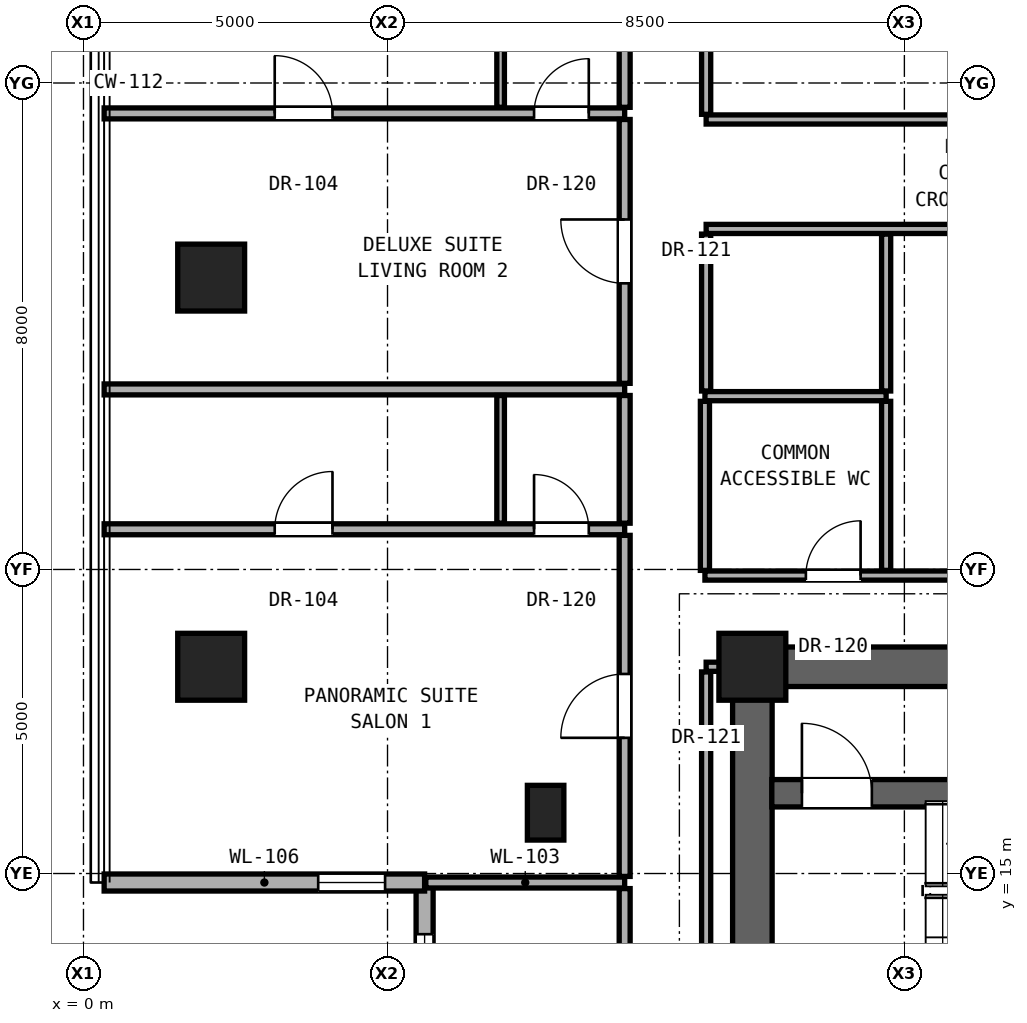
"""IFC4 building model, lengths in metres.
Left out: names, types, materials, properties, quantities, classifications, styles, units other than length and angle.
Written with IfcOpenShell. Run it as: python <this file> out.ifc"""

import sys

from ifc_helpers import new_model, si_unit, direction, frame, frame_2d, origin, origin_2d, place, context, subcontext, project, spatial, rectangle, hollow_rectangle, extrude, element, fill, save


model = new_model("IFC4")
c1 = context("Model", 3, precision=1e-05, world=origin(), true_north=direction((0.0, 1.0)))
c2 = subcontext(c1, "Body", "Model", "MODEL_VIEW")
j1 = project(units=[si_unit("LENGTHUNIT", "METRE"), si_unit("PLANEANGLEUNIT", "RADIAN")], contexts=[c1])
p1 = place(None, origin())
s1 = spatial("IfcSite", under=j1, at=p1, CompositionType="ELEMENT")
p2 = place(p1, origin())
s2 = spatial("IfcBuilding", under=s1, at=p2, CompositionType="ELEMENT")
p3 = place(p2, frame((0.0, 0.0, 121.4)))
s3 = spatial("IfcBuildingStorey", under=s2, at=p3, CompositionType="ELEMENT", Elevation=121.4)
p4 = place(p3, frame((11.0, 18.4, 0.0), z_axis=(0.0, 0.0, 1.0), x_axis=(1.0, 0.0, 0.0)))
e1 = element("IfcColumn", 1, at=p4, inside=s3, PredefinedType="COLUMN", context=c2, shape_type="SweptSolid", body=[
    extrude(rectangle(XDim=1.1, YDim=1.1, at=origin_2d()), origin(), (0.0, 0.0, 1.0), 3.3),
])
for number, where, z_axis, x_axis in (
    (2, (2.1, 18.4, 0.0), (0.0, 0.0, 1.0), (1.0, 0.0, 0.0)),
    (3, (2.1, 24.8, 0.0), (0.0, 0.0, 1.0), (1.0, 0.0, 0.0)),
):
    element("IfcColumn", number, at=place(p3, frame(where, z_axis=z_axis, x_axis=x_axis)), inside=s3, PredefinedType="COLUMN", context=c2, shape_type="SweptSolid", body=[
        extrude(hollow_rectangle(XDim=1.1, YDim=1.1, WallThickness=0.06, at=origin_2d()), origin(), (0.0, 0.0, 1.0), 3.3),
    ])
p5 = place(p3, frame((7.6, 16.0, 0.0), z_axis=(0.0, 0.0, 1.0), x_axis=(1.0, 0.0, 0.0)))
e4 = element("IfcColumn", 4, at=p5, inside=s3, PredefinedType="PILASTER", context=c2, shape_type="SweptSolid", body=[
    extrude(rectangle(XDim=0.6, YDim=0.9, at=origin_2d()), origin(), (0.0, 0.0, 1.0), 3.3),
])
p6 = place(p3, frame((11.0, 12.4, 0.0), z_axis=(0.0, 0.0, 1.0), x_axis=(0.0, 1.0, 0.0)))
e5 = element("IfcWall", 5, at=p6, inside=s3, PredefinedType="SHEAR", context=c2, shape_type="SweptSolid", body=[
    extrude(rectangle(XDim=6.0, YDim=0.65, at=frame_2d((3.0, 0.0))), origin(), (0.0, 0.0, 1.0), 3.08),
])
p7 = place(p3, frame((11.0, 18.4, 0.0), z_axis=(0.0, 0.0, 1.0), x_axis=(1.0, 0.0, 0.0)))
e6 = element("IfcWall", 6, at=p7, inside=s3, PredefinedType="SHEAR", context=c2, shape_type="SweptSolid", body=[
    extrude(rectangle(XDim=19.0, YDim=0.65, at=frame_2d((9.5, 0.0))), origin(), (0.0, 0.0, 1.0), 3.08),
])
p8 = place(p7, frame((4.175, 0.0, 0.0)))
e7 = element("IfcOpeningElement", 7, at=p8, cuts=e6, PredefinedType="OPENING", context=c2, shape_type="SweptSolid", body=[
    extrude(rectangle(XDim=1.2, YDim=2.25, at=frame_2d((0.6, 1.125))), frame((0.0, 0.335, 0.0), z_axis=(0.0, -1.0, 0.0), x_axis=(1.0, 0.0, 0.0)), (0.0, 0.0, 1.0), 0.67),
])
p9 = place(p7, frame((9.6, 0.0, 0.0)))
e8 = element("IfcOpeningElement", 8, at=p9, cuts=e6, PredefinedType="OPENING", context=c2, shape_type="SweptSolid", body=[
    extrude(rectangle(XDim=1.3, YDim=2.3, at=frame_2d((0.65, 1.15))), frame((0.0, 0.335, 0.0), z_axis=(0.0, -1.0, 0.0), x_axis=(1.0, 0.0, 0.0)), (0.0, 0.0, 1.0), 0.67),
])
p10 = place(p7, frame((11.9, 0.0, 0.0)))
e9 = element("IfcOpeningElement", 9, at=p10, cuts=e6, PredefinedType="OPENING", context=c2, shape_type="SweptSolid", body=[
    extrude(rectangle(XDim=1.3, YDim=2.3, at=frame_2d((0.65, 1.15))), frame((0.0, 0.335, 0.0), z_axis=(0.0, -1.0, 0.0), x_axis=(1.0, 0.0, 0.0)), (0.0, 0.0, 1.0), 0.67),
])
p11 = place(p7, frame((14.3, 0.0, 0.0)))
e10 = element("IfcOpeningElement", 10, at=p11, cuts=e6, PredefinedType="OPENING", context=c2, shape_type="SweptSolid", body=[
    extrude(rectangle(XDim=1.3, YDim=2.3, at=frame_2d((0.65, 1.15))), frame((0.0, 0.335, 0.0), z_axis=(0.0, -1.0, 0.0), x_axis=(1.0, 0.0, 0.0)), (0.0, 0.0, 1.0), 0.67),
])
p12 = place(p7, frame((16.6, 0.0, 0.0)))
e11 = element("IfcOpeningElement", 11, at=p12, cuts=e6, PredefinedType="OPENING", context=c2, shape_type="SweptSolid", body=[
    extrude(rectangle(XDim=1.3, YDim=2.3, at=frame_2d((0.65, 1.15))), frame((0.0, 0.335, 0.0), z_axis=(0.0, -1.0, 0.0), x_axis=(1.0, 0.0, 0.0)), (0.0, 0.0, 1.0), 0.67),
])
p13 = place(p3, frame((5.61, 14.852, 0.0), z_axis=(0.0, 0.0, 1.0), x_axis=(0.0, -1.0, 0.0)))
e12 = element("IfcWall", 12, at=p13, inside=s3, PredefinedType="SOLIDWALL", context=c2, shape_type="SweptSolid", body=[
    extrude(rectangle(XDim=5.27, YDim=0.28, at=frame_2d((2.635, 0.0))), origin(), (0.0, 0.0, 1.0), 3.06),
])
p14 = place(p13, frame((0.85, 0.0, 0.81)))
e13 = element("IfcOpeningElement", 13, at=p14, cuts=e12, PredefinedType="OPENING", context=c2, shape_type="SweptSolid", body=[
    extrude(rectangle(XDim=1.5, YDim=2.1, at=frame_2d((0.75, 1.05))), frame((0.0, 0.15, 0.0), z_axis=(0.0, -1.0, 0.0), x_axis=(1.0, 0.0, 0.0)), (0.0, 0.0, 1.0), 0.3),
])
p15 = place(p3, frame((0.34, 14.852, 0.0), z_axis=(0.0, 0.0, 1.0), x_axis=(1.0, 0.0, 0.0)))
e14 = element("IfcWall", 14, at=p15, inside=s3, PredefinedType="SOLIDWALL", context=c2, shape_type="SweptSolid", body=[
    extrude(rectangle(XDim=5.27, YDim=0.28, at=frame_2d((2.635, 0.0))), origin(), (0.0, 0.0, 1.0), 3.06),
])
p16 = place(p15, frame((3.52, 0.0, 0.85)))
e15 = element("IfcOpeningElement", 15, at=p16, cuts=e14, PredefinedType="OPENING", context=c2, shape_type="SweptSolid", body=[
    extrude(rectangle(XDim=1.1, YDim=2.0, at=frame_2d((0.55, 1.0))), frame((0.0, 0.15, 0.0), z_axis=(0.0, -1.0, 0.0), x_axis=(1.0, 0.0, 0.0)), (0.0, 0.0, 1.0), 0.3),
])
p17 = place(p3, frame((5.63, 14.852, 0.0), z_axis=(0.0, 0.0, 1.0), x_axis=(1.0, 0.0, 0.0)))
e16 = element("IfcWall", 16, at=p17, inside=s3, PredefinedType="PARTITIONING", context=c2, shape_type="SweptSolid", body=[
    extrude(rectangle(XDim=3.27, YDim=0.18, at=frame_2d((1.635, 0.0))), origin(), (0.0, 0.0, 1.0), 3.08),
])
p18 = place(p3, frame((11.32, 16.32, 0.0), z_axis=(0.0, 0.0, 1.0), x_axis=(1.0, 0.0, 0.0)))
e17 = element("IfcWall", 17, at=p18, inside=s3, PredefinedType="SHEAR", context=c2, shape_type="SweptSolid", body=[
    extrude(rectangle(XDim=8.96, YDim=0.45, at=frame_2d((4.48, 0.0))), origin(), (0.0, 0.0, 1.0), 3.08),
])
p19 = place(p18, frame((0.495, 0.0, 0.0)))
e18 = element("IfcOpeningElement", 18, at=p19, cuts=e17, PredefinedType="OPENING", context=c2, shape_type="SweptSolid", body=[
    extrude(rectangle(XDim=1.15, YDim=2.2, at=frame_2d((0.575, 1.1))), frame((0.0, 0.235, 0.0), z_axis=(0.0, -1.0, 0.0), x_axis=(1.0, 0.0, 0.0)), (0.0, 0.0, 1.0), 0.47),
])
p20 = place(p3, frame((10.24, 18.4, 0.0), z_axis=(0.0, 0.0, 1.0), x_axis=(1.0, 0.0, 0.0)))
e19 = element("IfcWall", 19, at=p20, inside=s3, PredefinedType="PARTITIONING", context=c2, shape_type="SweptSolid", body=[
    extrude(rectangle(XDim=0.44, YDim=0.15, at=frame_2d((0.22, 0.0))), origin(), (0.0, 0.0, 1.0), 2.456),
])
p21 = place(p3, frame((10.22, 19.9, 0.0), z_axis=(0.0, 0.0, 1.0), x_axis=(1.0, 0.0, 0.0)))
e20 = element("IfcWall", 20, at=p21, inside=s3, PredefinedType="PARTITIONING", context=c2, shape_type="SweptSolid", body=[
    extrude(rectangle(XDim=9.34, YDim=0.15, at=frame_2d((4.67, 0.0))), origin(), (0.0, 0.0, 1.0), 2.216),
])
p22 = place(p21, frame((1.66, 0.0, 0.0)))
e21 = element("IfcOpeningElement", 21, at=p22, cuts=e20, PredefinedType="OPENING", context=c2, shape_type="SweptSolid", body=[
    extrude(rectangle(XDim=0.9, YDim=2.1, at=frame_2d((0.45, 1.05))), frame((0.0, 0.085, 0.0), z_axis=(0.0, -1.0, 0.0), x_axis=(1.0, 0.0, 0.0)), (0.0, 0.0, 1.0), 0.17),
])
p23 = place(p21, frame((5.665, 0.0, 0.0)))
e22 = element("IfcOpeningElement", 22, at=p23, cuts=e20, PredefinedType="OPENING", context=c2, shape_type="SweptSolid", body=[
    extrude(rectangle(XDim=0.95, YDim=2.15, at=frame_2d((0.475, 1.075))), frame((0.0, 0.085, 0.0), z_axis=(0.0, -1.0, 0.0), x_axis=(1.0, 0.0, 0.0)), (0.0, 0.0, 1.0), 0.17),
])
p24 = place(p3, frame((0.34, 20.661, 0.0), z_axis=(0.0, 0.0, 1.0), x_axis=(1.0, 0.0, 0.0)))
e23 = element("IfcWall", 23, at=p24, inside=s3, PredefinedType="PARTITIONING", context=c2, shape_type="SweptSolid", body=[
    extrude(rectangle(XDim=8.56, YDim=0.18, at=frame_2d((4.28, 0.0))), origin(), (0.0, 0.0, 1.0), 2.299),
])
p25 = place(p24, frame((2.805, 0.0, 0.0)))
e24 = element("IfcOpeningElement", 24, at=p25, cuts=e23, PredefinedType="OPENING", context=c2, shape_type="SweptSolid", body=[
    extrude(rectangle(XDim=0.95, YDim=2.15, at=frame_2d((0.475, 1.075))), frame((0.0, 0.1, 0.0), z_axis=(0.0, -1.0, 0.0), x_axis=(1.0, 0.0, 0.0)), (0.0, 0.0, 1.0), 0.2),
])
p26 = place(p24, frame((7.07, 0.0, 0.0)))
e25 = element("IfcOpeningElement", 25, at=p26, cuts=e23, PredefinedType="OPENING", context=c2, shape_type="SweptSolid", body=[
    extrude(rectangle(XDim=0.9, YDim=2.1, at=frame_2d((0.45, 1.05))), frame((0.0, 0.1, 0.0), z_axis=(0.0, -1.0, 0.0), x_axis=(1.0, 0.0, 0.0)), (0.0, 0.0, 1.0), 0.2),
])
p27 = place(p3, frame((0.34, 22.961, 0.0), z_axis=(0.0, 0.0, 1.0), x_axis=(1.0, 0.0, 0.0)))
e26 = element("IfcWall", 26, at=p27, inside=s3, PredefinedType="PARTITIONING", context=c2, shape_type="SweptSolid", body=[
    extrude(rectangle(XDim=8.56, YDim=0.18, at=frame_2d((4.28, 0.0))), origin(), (0.0, 0.0, 1.0), 2.299),
])
p28 = place(p3, frame((10.22, 22.85, 0.0), z_axis=(0.0, 0.0, 1.0), x_axis=(1.0, 0.0, 0.0)))
e27 = element("IfcWall", 27, at=p28, inside=s3, PredefinedType="PARTITIONING", context=c2, shape_type="SweptSolid", body=[
    extrude(rectangle(XDim=2.98, YDim=0.15, at=frame_2d((1.49, 0.0))), origin(), (0.0, 0.0, 1.0), 2.216),
])
p29 = place(p3, frame((10.24, 25.6, 0.0), z_axis=(0.0, 0.0, 1.0), x_axis=(1.0, 0.0, 0.0)))
e28 = element("IfcWall", 28, at=p29, inside=s3, PredefinedType="PARTITIONING", context=c2, shape_type="SweptSolid", body=[
    extrude(rectangle(XDim=9.36, YDim=0.15, at=frame_2d((4.68, 0.0))), origin(), (0.0, 0.0, 1.0), 2.216),
])
p30 = place(p3, frame((0.34, 27.5, 0.0), z_axis=(0.0, 0.0, 1.0), x_axis=(1.0, 0.0, 0.0)))
e29 = element("IfcWall", 29, at=p30, inside=s3, PredefinedType="PARTITIONING", context=c2, shape_type="SweptSolid", body=[
    extrude(rectangle(XDim=8.56, YDim=0.18, at=frame_2d((4.28, 0.0))), origin(), (0.0, 0.0, 1.0), 2.299),
])
p31 = place(p30, frame((2.805, 0.0, 0.0)))
e30 = element("IfcOpeningElement", 30, at=p31, cuts=e29, PredefinedType="OPENING", context=c2, shape_type="SweptSolid", body=[
    extrude(rectangle(XDim=0.95, YDim=2.15, at=frame_2d((0.475, 1.075))), frame((0.0, 0.1, 0.0), z_axis=(0.0, -1.0, 0.0), x_axis=(1.0, 0.0, 0.0)), (0.0, 0.0, 1.0), 0.2),
])
p32 = place(p30, frame((7.07, 0.0, 0.0)))
e31 = element("IfcOpeningElement", 31, at=p32, cuts=e29, PredefinedType="OPENING", context=c2, shape_type="SweptSolid", body=[
    extrude(rectangle(XDim=0.9, YDim=2.1, at=frame_2d((0.45, 1.05))), frame((0.0, 0.1, 0.0), z_axis=(0.0, -1.0, 0.0), x_axis=(1.0, 0.0, 0.0)), (0.0, 0.0, 1.0), 0.2),
])
p33 = place(p3, frame((10.24, 27.4, 0.0), z_axis=(0.0, 0.0, 1.0), x_axis=(1.0, 0.0, 0.0)))
e32 = element("IfcWall", 32, at=p33, inside=s3, PredefinedType="PARTITIONING", context=c2, shape_type="SweptSolid", body=[
    extrude(rectangle(XDim=9.36, YDim=0.15, at=frame_2d((4.68, 0.0))), origin(), (0.0, 0.0, 1.0), 2.216),
])
p34 = place(p3, frame((6.86, 20.761, 0.0), z_axis=(0.0, 0.0, 1.0), x_axis=(0.0, 1.0, 0.0)))
e33 = element("IfcWall", 33, at=p34, inside=s3, PredefinedType="PARTITIONING", context=c2, shape_type="SweptSolid", body=[
    extrude(rectangle(XDim=2.1, YDim=0.125, at=frame_2d((1.05, 0.0))), origin(), (0.0, 0.0, 1.0), 3.08),
])
p35 = place(p3, frame((6.86, 27.6, 0.0), z_axis=(0.0, 0.0, 1.0), x_axis=(0.0, 1.0, 0.0)))
e34 = element("IfcWall", 34, at=p35, inside=s3, PredefinedType="PARTITIONING", context=c2, shape_type="SweptSolid", body=[
    extrude(rectangle(XDim=2.127, YDim=0.125, at=frame_2d((1.064, 0.0))), origin(), (0.0, 0.0, 1.0), 3.08),
])
p36 = place(p3, frame((8.9, 9.582, 0.0), z_axis=(0.0, 0.0, 1.0), x_axis=(0.0, 1.0, 0.0)))
e35 = element("IfcWall", 35, at=p36, inside=s3, PredefinedType="PARTITIONING", context=c2, shape_type="SweptSolid", body=[
    extrude(rectangle(XDim=5.17, YDim=0.18, at=frame_2d((2.585, 0.0))), origin(), (0.0, 0.0, 1.0), 3.08),
])
p37 = place(p36, frame((2.11, 0.0, 0.0)))
e36 = element("IfcOpeningElement", 36, at=p37, cuts=e35, PredefinedType="OPENING", context=c2, shape_type="SweptSolid", body=[
    extrude(rectangle(XDim=0.95, YDim=2.15, at=frame_2d((0.475, 1.075))), frame((0.0, 0.1, 0.0), z_axis=(0.0, -1.0, 0.0), x_axis=(1.0, 0.0, 0.0)), (0.0, 0.0, 1.0), 0.2),
])
p38 = place(p3, frame((8.9, 14.952, 0.0), z_axis=(0.0, 0.0, 1.0), x_axis=(0.0, 1.0, 0.0)))
e37 = element("IfcWall", 37, at=p38, inside=s3, PredefinedType="PARTITIONING", context=c2, shape_type="SweptSolid", body=[
    extrude(rectangle(XDim=5.609, YDim=0.18, at=frame_2d((2.805, 0.0))), origin(), (0.0, 0.0, 1.0), 2.456),
])
p39 = place(p38, frame((2.28, 0.0, 0.0)))
e38 = element("IfcOpeningElement", 38, at=p39, cuts=e37, PredefinedType="OPENING", context=c2, shape_type="SweptSolid", body=[
    extrude(rectangle(XDim=1.05, YDim=2.2, at=frame_2d((0.525, 1.1))), frame((0.0, 0.1, 0.0), z_axis=(0.0, -1.0, 0.0), x_axis=(1.0, 0.0, 0.0)), (0.0, 0.0, 1.0), 0.2),
])
p40 = place(p3, frame((8.9, 20.761, 0.0), z_axis=(0.0, 0.0, 1.0), x_axis=(0.0, 1.0, 0.0)))
e39 = element("IfcWall", 39, at=p40, inside=s3, PredefinedType="PARTITIONING", context=c2, shape_type="SweptSolid", body=[
    extrude(rectangle(XDim=2.1, YDim=0.18, at=frame_2d((1.05, 0.0))), origin(), (0.0, 0.0, 1.0), 3.08),
])
p41 = place(p3, frame((8.9, 23.061, 0.0), z_axis=(0.0, 0.0, 1.0), x_axis=(0.0, 1.0, 0.0)))
e40 = element("IfcWall", 40, at=p41, inside=s3, PredefinedType="PARTITIONING", context=c2, shape_type="SweptSolid", body=[
    extrude(rectangle(XDim=4.339, YDim=0.18, at=frame_2d((2.169, 0.0))), origin(), (0.0, 0.0, 1.0), 2.299),
])
p42 = place(p41, frame((1.645, 0.0, 0.0)))
e41 = element("IfcOpeningElement", 41, at=p42, cuts=e40, PredefinedType="OPENING", context=c2, shape_type="SweptSolid", body=[
    extrude(rectangle(XDim=1.05, YDim=2.2, at=frame_2d((0.525, 1.1))), frame((0.0, 0.1, 0.0), z_axis=(0.0, -1.0, 0.0), x_axis=(1.0, 0.0, 0.0)), (0.0, 0.0, 1.0), 0.2),
])
p43 = place(p3, frame((8.9, 27.6, 0.0), z_axis=(0.0, 0.0, 1.0), x_axis=(0.0, 1.0, 0.0)))
e42 = element("IfcWall", 42, at=p43, inside=s3, PredefinedType="PARTITIONING", context=c2, shape_type="SweptSolid", body=[
    extrude(rectangle(XDim=2.127, YDim=0.18, at=frame_2d((1.064, 0.0))), origin(), (0.0, 0.0, 1.0), 3.08),
])
p44 = place(p3, frame((10.22, 19.985, 0.0), z_axis=(0.0, 0.0, 1.0), x_axis=(0.0, 1.0, 0.0)))
e43 = element("IfcWall", 43, at=p44, inside=s3, PredefinedType="PARTITIONING", context=c2, shape_type="SweptSolid", body=[
    extrude(rectangle(XDim=2.78, YDim=0.15, at=frame_2d((1.39, 0.0))), origin(), (0.0, 0.0, 1.0), 3.08),
])
p45 = place(p3, frame((10.24, 12.335, 0.0), z_axis=(0.0, 0.0, 1.0), x_axis=(0.0, 1.0, 0.0)))
e44 = element("IfcWall", 44, at=p45, inside=s3, PredefinedType="PARTITIONING", context=c2, shape_type="SweptSolid", body=[
    extrude(rectangle(XDim=5.98, YDim=0.15, at=frame_2d((2.99, 0.0))), origin(), (0.0, 0.0, 1.0), 2.456),
])
p46 = place(p3, frame((10.24, 22.935, 0.0), z_axis=(0.0, 0.0, 1.0), x_axis=(0.0, 1.0, 0.0)))
e45 = element("IfcWall", 45, at=p46, inside=s3, PredefinedType="PARTITIONING", context=c2, shape_type="SweptSolid", body=[
    extrude(rectangle(XDim=2.58, YDim=0.15, at=frame_2d((1.29, 0.0))), origin(), (0.0, 0.0, 1.0), 2.299),
])
p47 = place(p3, frame((10.24, 27.485, 0.0), z_axis=(0.0, 0.0, 1.0), x_axis=(0.0, 1.0, 0.0)))
e46 = element("IfcWall", 46, at=p47, inside=s3, PredefinedType="PARTITIONING", context=c2, shape_type="SweptSolid", body=[
    extrude(rectangle(XDim=5.53, YDim=0.15, at=frame_2d((2.765, 0.0))), origin(), (0.0, 0.0, 1.0), 2.299),
])
p48 = place(p47, frame((2.29, 0.0, 0.0)))
e47 = element("IfcOpeningElement", 47, at=p48, cuts=e46, PredefinedType="OPENING", context=c2, shape_type="SweptSolid", body=[
    extrude(rectangle(XDim=0.95, YDim=2.15, at=frame_2d((0.475, 1.075))), frame((0.0, 0.085, 0.0), z_axis=(0.0, -1.0, 0.0), x_axis=(1.0, 0.0, 0.0)), (0.0, 0.0, 1.0), 0.17),
])
p49 = place(p3, frame((13.2, 19.985, 0.0), z_axis=(0.0, 0.0, 1.0), x_axis=(0.0, 1.0, 0.0)))
e48 = element("IfcWall", 48, at=p49, inside=s3, PredefinedType="PARTITIONING", context=c2, shape_type="SweptSolid", body=[
    extrude(rectangle(XDim=2.78, YDim=0.15, at=frame_2d((1.39, 0.0))), origin(), (0.0, 0.0, 1.0), 3.08),
])
p50 = place(p3, frame((13.2, 22.935, 0.0), z_axis=(0.0, 0.0, 1.0), x_axis=(0.0, 1.0, 0.0)))
e49 = element("IfcWall", 49, at=p50, inside=s3, PredefinedType="PARTITIONING", context=c2, shape_type="SweptSolid", body=[
    extrude(rectangle(XDim=2.58, YDim=0.15, at=frame_2d((1.29, 0.0))), origin(), (0.0, 0.0, 1.0), 2.216),
])
p51 = place(p14, origin())
e50 = element("IfcWindow", 50, at=p51, inside=s3, PartitioningType="SINGLE_PANEL", PredefinedType="WINDOW", context=c2, shape_type="SweptSolid", body=[
    extrude(rectangle(XDim=1.5, YDim=2.1, at=frame_2d((0.75, 1.05))), frame((0.0, 0.03, 0.0), z_axis=(0.0, -1.0, 0.0), x_axis=(1.0, 0.0, 0.0)), (0.0, 0.0, 1.0), 0.06),
])
fill(e13, e50)
p52 = place(p16, origin())
e51 = element("IfcWindow", 51, at=p52, inside=s3, PartitioningType="SINGLE_PANEL", PredefinedType="WINDOW", context=c2, shape_type="SweptSolid", body=[
    extrude(rectangle(XDim=1.1, YDim=2.0, at=frame_2d((0.55, 1.0))), frame((0.0, 0.03, 0.0), z_axis=(0.0, -1.0, 0.0), x_axis=(1.0, 0.0, 0.0)), (0.0, 0.0, 1.0), 0.06),
])
fill(e15, e51)
p53 = place(p19, origin())
e52 = element("IfcDoor", 52, at=p53, inside=s3, OperationType="SINGLE_SWING_LEFT", PredefinedType="DOOR", context=c2, shape_type="SweptSolid", body=[
    extrude(rectangle(XDim=1.15, YDim=2.2, at=frame_2d((0.575, 1.1))), frame((0.0, 0.025, 0.0), z_axis=(0.0, -1.0, 0.0), x_axis=(1.0, 0.0, 0.0)), (0.0, 0.0, 1.0), 0.05),
])
fill(e18, e52)
p54 = place(p22, origin())
e53 = element("IfcDoor", 53, at=p54, inside=s3, OperationType="SINGLE_SWING_RIGHT", PredefinedType="DOOR", context=c2, shape_type="SweptSolid", body=[
    extrude(rectangle(XDim=0.9, YDim=2.1, at=frame_2d((0.45, 1.05))), frame((0.0, 0.025, 0.0), z_axis=(0.0, -1.0, 0.0), x_axis=(1.0, 0.0, 0.0)), (0.0, 0.0, 1.0), 0.05),
])
fill(e21, e53)
p55 = place(p39, origin())
e54 = element("IfcDoor", 54, at=p55, inside=s3, OperationType="SINGLE_SWING_LEFT", PredefinedType="DOOR", context=c2, shape_type="SweptSolid", body=[
    extrude(rectangle(XDim=1.05, YDim=2.2, at=frame_2d((0.525, 1.1))), frame((0.0, 0.025, 0.0), z_axis=(0.0, -1.0, 0.0), x_axis=(1.0, 0.0, 0.0)), (0.0, 0.0, 1.0), 0.05),
])
fill(e38, e54)
p56 = place(p25, origin())
e55 = element("IfcDoor", 55, at=p56, inside=s3, OperationType="SINGLE_SWING_RIGHT", PredefinedType="DOOR", context=c2, shape_type="SweptSolid", body=[
    extrude(rectangle(XDim=0.95, YDim=2.15, at=frame_2d((0.475, 1.075))), frame((0.0, 0.025, 0.0), z_axis=(0.0, -1.0, 0.0), x_axis=(1.0, 0.0, 0.0)), (0.0, 0.0, 1.0), 0.05),
])
fill(e24, e55)
p57 = place(p26, origin())
e56 = element("IfcDoor", 56, at=p57, inside=s3, OperationType="SINGLE_SWING_LEFT", PredefinedType="DOOR", context=c2, shape_type="SweptSolid", body=[
    extrude(rectangle(XDim=0.9, YDim=2.1, at=frame_2d((0.45, 1.05))), frame((0.0, 0.025, 0.0), z_axis=(0.0, -1.0, 0.0), x_axis=(1.0, 0.0, 0.0)), (0.0, 0.0, 1.0), 0.05),
])
fill(e25, e56)
p58 = place(p42, origin())
e57 = element("IfcDoor", 57, at=p58, inside=s3, OperationType="SINGLE_SWING_RIGHT", PredefinedType="DOOR", context=c2, shape_type="SweptSolid", body=[
    extrude(rectangle(XDim=1.05, YDim=2.2, at=frame_2d((0.525, 1.1))), frame((0.0, 0.025, 0.0), z_axis=(0.0, -1.0, 0.0), x_axis=(1.0, 0.0, 0.0)), (0.0, 0.0, 1.0), 0.05),
])
fill(e41, e57)
p59 = place(p31, origin())
e58 = element("IfcDoor", 58, at=p59, inside=s3, OperationType="SINGLE_SWING_LEFT", PredefinedType="DOOR", context=c2, shape_type="SweptSolid", body=[
    extrude(rectangle(XDim=0.95, YDim=2.15, at=frame_2d((0.475, 1.075))), frame((0.0, 0.025, 0.0), z_axis=(0.0, -1.0, 0.0), x_axis=(1.0, 0.0, 0.0)), (0.0, 0.0, 1.0), 0.05),
])
fill(e30, e58)
p60 = place(p32, origin())
e59 = element("IfcDoor", 59, at=p60, inside=s3, OperationType="SINGLE_SWING_RIGHT", PredefinedType="DOOR", context=c2, shape_type="SweptSolid", body=[
    extrude(rectangle(XDim=0.9, YDim=2.1, at=frame_2d((0.45, 1.05))), frame((0.0, 0.025, 0.0), z_axis=(0.0, -1.0, 0.0), x_axis=(1.0, 0.0, 0.0)), (0.0, 0.0, 1.0), 0.05),
])
fill(e31, e59)
save(model, sys.argv[1])
